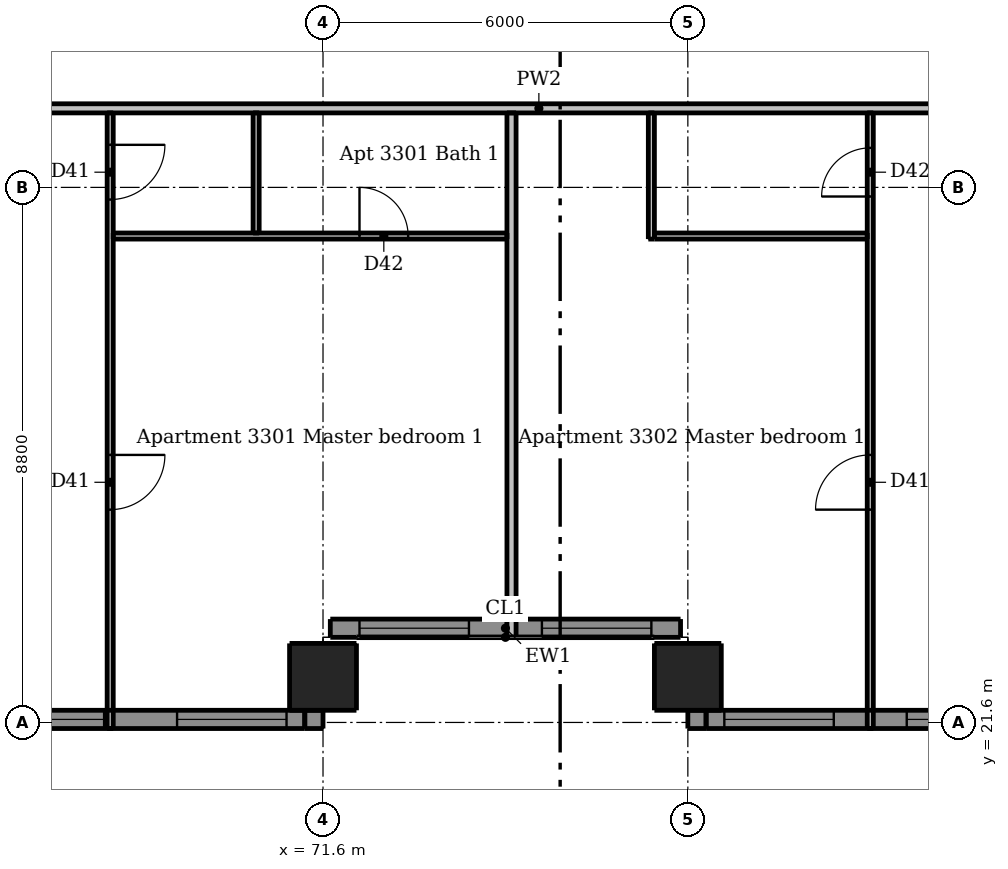
"""IFC4 building model, lengths in metres.
Left out: names, types, materials, properties, quantities, classifications, styles, units other than length and angle.
Written with IfcOpenShell. Run it as: python <this file> out.ifc"""

import sys

from ifc_helpers import new_model, si_unit, direction, frame, frame_2d, origin, origin_2d, place, context, subcontext, project, spatial, rectangle, extrude, element, fill, save


model = new_model("IFC4")
c1 = context("Model", 3, precision=1e-05, world=origin(), true_north=direction((0.0, 1.0)))
c2 = subcontext(c1, "Body", "Model", "MODEL_VIEW")
j1 = project(units=[si_unit("LENGTHUNIT", "METRE"), si_unit("PLANEANGLEUNIT", "RADIAN")], contexts=[c1])
p1 = place(None, origin())
s1 = spatial("IfcSite", under=j1, at=p1, CompositionType="ELEMENT")
p2 = place(p1, origin())
s2 = spatial("IfcBuilding", under=s1, at=p2, CompositionType="ELEMENT")
p3 = place(p2, frame((0.0, 0.0, 121.6)))
s3 = spatial("IfcBuildingStorey", under=s2, at=p3, CompositionType="ELEMENT", Elevation=121.6)
for number, where, z_axis, x_axis in (
    (1, (71.6, 22.35, 0.0), (0.0, 0.0, 1.0), (1.0, 0.0, 0.0)),
    (2, (77.6, 22.35, 0.0), (0.0, 0.0, 1.0), (1.0, 0.0, 0.0)),
):
    element("IfcColumn", number, at=place(p3, frame(where, z_axis=z_axis, x_axis=x_axis)), inside=s3, PredefinedType="COLUMN", context=c2, shape_type="SweptSolid", body=[
        extrude(rectangle(XDim=1.1, YDim=1.1, at=origin_2d()), origin(), (0.0, 0.0, 1.0), 2.95),
    ])
for number, where, z_axis, x_axis in (
    (3, (71.45, 21.5, 0.0), (0.0, 0.0, 1.0), (0.0, 1.0, 0.0)),
    (4, (77.75, 21.8, 0.0), (0.0, 0.0, 1.0), (0.0, -1.0, 0.0)),
):
    element("IfcWall", number, at=place(p3, frame(where, z_axis=z_axis, x_axis=x_axis)), inside=s3, PredefinedType="SOLIDWALL", context=c2, shape_type="SweptSolid", body=[
        extrude(rectangle(XDim=0.3, YDim=0.3, at=frame_2d((0.15, 0.0))), origin(), (0.0, 0.0, 1.0), 2.95),
    ])
p4 = place(p3, frame((65.6, 21.65, 0.0), z_axis=(0.0, 0.0, 1.0), x_axis=(1.0, 0.0, 0.0)))
e5 = element("IfcWall", 5, at=p4, inside=s3, PredefinedType="SOLIDWALL", context=c2, shape_type="SweptSolid", body=[
    extrude(rectangle(XDim=5.7, YDim=0.3, at=frame_2d((2.85, 0.0))), origin(), (0.0, 0.0, 1.0), 2.34),
])
p5 = place(p4, frame((0.6, 0.0, 0.15)))
e6 = element("IfcOpeningElement", 6, at=p5, cuts=e5, PredefinedType="OPENING", context=c2, shape_type="SweptSolid", body=[
    extrude(rectangle(XDim=1.8, YDim=2.1, at=frame_2d((0.9, 1.05))), frame((0.0, 0.16, 0.0), z_axis=(0.0, -1.0, 0.0), x_axis=(1.0, 0.0, 0.0)), (0.0, 0.0, 1.0), 0.32),
])
p6 = place(p4, frame((3.6, 0.0, 0.15)))
e7 = element("IfcOpeningElement", 7, at=p6, cuts=e5, PredefinedType="OPENING", context=c2, shape_type="SweptSolid", body=[
    extrude(rectangle(XDim=1.8, YDim=2.1, at=frame_2d((0.9, 1.05))), frame((0.0, 0.16, 0.0), z_axis=(0.0, -1.0, 0.0), x_axis=(1.0, 0.0, 0.0)), (0.0, 0.0, 1.0), 0.32),
])
p7 = place(p3, frame((71.72, 23.15, 0.0), z_axis=(0.0, 0.0, 1.0), x_axis=(1.0, 0.0, 0.0)))
e8 = element("IfcWall", 8, at=p7, inside=s3, PredefinedType="SOLIDWALL", context=c2, shape_type="SweptSolid", body=[
    extrude(rectangle(XDim=5.76, YDim=0.3, at=frame_2d((2.88, 0.0))), origin(), (0.0, 0.0, 1.0), 2.34),
])
p8 = place(p7, frame((0.48, 0.0, 0.15)))
e9 = element("IfcOpeningElement", 9, at=p8, cuts=e8, PredefinedType="OPENING", context=c2, shape_type="SweptSolid", body=[
    extrude(rectangle(XDim=1.8, YDim=2.1, at=frame_2d((0.9, 1.05))), frame((0.0, 0.16, 0.0), z_axis=(0.0, -1.0, 0.0), x_axis=(1.0, 0.0, 0.0)), (0.0, 0.0, 1.0), 0.32),
])
p9 = place(p7, frame((3.48, 0.0, 0.15)))
e10 = element("IfcOpeningElement", 10, at=p9, cuts=e8, PredefinedType="OPENING", context=c2, shape_type="SweptSolid", body=[
    extrude(rectangle(XDim=1.8, YDim=2.1, at=frame_2d((0.9, 1.05))), frame((0.0, 0.16, 0.0), z_axis=(0.0, -1.0, 0.0), x_axis=(1.0, 0.0, 0.0)), (0.0, 0.0, 1.0), 0.32),
])
p10 = place(p3, frame((77.9, 21.65, 0.0), z_axis=(0.0, 0.0, 1.0), x_axis=(1.0, 0.0, 0.0)))
e11 = element("IfcWall", 11, at=p10, inside=s3, PredefinedType="SOLIDWALL", context=c2, shape_type="SweptSolid", body=[
    extrude(rectangle(XDim=5.4, YDim=0.3, at=frame_2d((2.7, 0.0))), origin(), (0.0, 0.0, 1.0), 2.34),
])
p11 = place(p10, frame((0.3, 0.0, 0.15)))
e12 = element("IfcOpeningElement", 12, at=p11, cuts=e11, PredefinedType="OPENING", context=c2, shape_type="SweptSolid", body=[
    extrude(rectangle(XDim=1.8, YDim=2.1, at=frame_2d((0.9, 1.05))), frame((0.0, 0.16, 0.0), z_axis=(0.0, -1.0, 0.0), x_axis=(1.0, 0.0, 0.0)), (0.0, 0.0, 1.0), 0.32),
])
p12 = place(p10, frame((3.3, 0.0, 0.15)))
e13 = element("IfcOpeningElement", 13, at=p12, cuts=e11, PredefinedType="OPENING", context=c2, shape_type="SweptSolid", body=[
    extrude(rectangle(XDim=1.8, YDim=2.1, at=frame_2d((0.9, 1.05))), frame((0.0, 0.16, 0.0), z_axis=(0.0, -1.0, 0.0), x_axis=(1.0, 0.0, 0.0)), (0.0, 0.0, 1.0), 0.32),
])
p13 = place(p3, frame((68.1, 31.625, 0.0), z_axis=(0.0, 0.0, 1.0), x_axis=(0.0, -1.0, 0.0)))
e14 = element("IfcWall", 14, at=p13, inside=s3, PredefinedType="PARTITIONING", context=c2, shape_type="SweptSolid", body=[
    extrude(rectangle(XDim=10.125, YDim=0.1, at=frame_2d((5.062, 0.0))), origin(), (0.0, 0.0, 1.0), 2.95),
])
p14 = place(p13, frame((0.525, 0.0, 0.0)))
e15 = element("IfcOpeningElement", 15, at=p14, cuts=e14, PredefinedType="OPENING", context=c2, shape_type="SweptSolid", body=[
    extrude(rectangle(XDim=0.9, YDim=2.1, at=frame_2d((0.45, 1.05))), frame((0.0, 0.06, 0.0), z_axis=(0.0, -1.0, 0.0), x_axis=(1.0, 0.0, 0.0)), (0.0, 0.0, 1.0), 0.12),
])
p15 = place(p13, frame((5.625, 0.0, 0.0)))
e16 = element("IfcOpeningElement", 16, at=p15, cuts=e14, PredefinedType="OPENING", context=c2, shape_type="SweptSolid", body=[
    extrude(rectangle(XDim=0.9, YDim=2.1, at=frame_2d((0.45, 1.05))), frame((0.0, 0.06, 0.0), z_axis=(0.0, -1.0, 0.0), x_axis=(1.0, 0.0, 0.0)), (0.0, 0.0, 1.0), 0.12),
])
p16 = place(p3, frame((70.5, 29.65, 0.0), z_axis=(0.0, 0.0, 1.0), x_axis=(0.0, 1.0, 0.0)))
e17 = element("IfcWall", 17, at=p16, inside=s3, PredefinedType="PARTITIONING", context=c2, shape_type="SweptSolid", body=[
    extrude(rectangle(XDim=1.975, YDim=0.1, at=frame_2d((0.988, 0.0))), origin(), (0.0, 0.0, 1.0), 2.95),
])
p17 = place(p3, frame((77.0, 29.55, 0.0), z_axis=(0.0, 0.0, 1.0), x_axis=(0.0, 1.0, 0.0)))
e18 = element("IfcWall", 18, at=p17, inside=s3, PredefinedType="PARTITIONING", context=c2, shape_type="SweptSolid", body=[
    extrude(rectangle(XDim=2.075, YDim=0.1, at=frame_2d((1.038, 0.0))), origin(), (0.0, 0.0, 1.0), 2.95),
])
p18 = place(p3, frame((80.6, 21.5, 0.0), z_axis=(0.0, 0.0, 1.0), x_axis=(0.0, 1.0, 0.0)))
e19 = element("IfcWall", 19, at=p18, inside=s3, PredefinedType="PARTITIONING", context=c2, shape_type="SweptSolid", body=[
    extrude(rectangle(XDim=10.125, YDim=0.1, at=frame_2d((5.062, 0.0))), origin(), (0.0, 0.0, 1.0), 2.95),
])
p19 = place(p18, frame((3.6, 0.0, 0.0)))
e20 = element("IfcOpeningElement", 20, at=p19, cuts=e19, PredefinedType="OPENING", context=c2, shape_type="SweptSolid", body=[
    extrude(rectangle(XDim=0.9, YDim=2.1, at=frame_2d((0.45, 1.05))), frame((0.0, 0.06, 0.0), z_axis=(0.0, -1.0, 0.0), x_axis=(1.0, 0.0, 0.0)), (0.0, 0.0, 1.0), 0.12),
])
p20 = place(p18, frame((8.75, 0.0, 0.0)))
e21 = element("IfcOpeningElement", 21, at=p20, cuts=e19, PredefinedType="OPENING", context=c2, shape_type="SweptSolid", body=[
    extrude(rectangle(XDim=0.8, YDim=2.1, at=frame_2d((0.4, 1.05))), frame((0.0, 0.06, 0.0), z_axis=(0.0, -1.0, 0.0), x_axis=(1.0, 0.0, 0.0)), (0.0, 0.0, 1.0), 0.12),
])
p21 = place(p3, frame((68.15, 29.6, 0.0), z_axis=(0.0, 0.0, 1.0), x_axis=(1.0, 0.0, 0.0)))
e22 = element("IfcWall", 22, at=p21, inside=s3, PredefinedType="PARTITIONING", context=c2, shape_type="SweptSolid", body=[
    extrude(rectangle(XDim=6.475, YDim=0.1, at=frame_2d((3.238, 0.0))), origin(), (0.0, 0.0, 1.0), 2.95),
])
p22 = place(p21, frame((4.05, 0.0, 0.0)))
e23 = element("IfcOpeningElement", 23, at=p22, cuts=e22, PredefinedType="OPENING", context=c2, shape_type="SweptSolid", body=[
    extrude(rectangle(XDim=0.8, YDim=2.1, at=frame_2d((0.4, 1.05))), frame((0.0, 0.06, 0.0), z_axis=(0.0, -1.0, 0.0), x_axis=(1.0, 0.0, 0.0)), (0.0, 0.0, 1.0), 0.12),
])
p23 = place(p3, frame((77.05, 29.6, 0.0), z_axis=(0.0, 0.0, 1.0), x_axis=(1.0, 0.0, 0.0)))
e24 = element("IfcWall", 24, at=p23, inside=s3, PredefinedType="PARTITIONING", context=c2, shape_type="SweptSolid", body=[
    extrude(rectangle(XDim=3.5, YDim=0.1, at=frame_2d((1.75, 0.0))), origin(), (0.0, 0.0, 1.0), 2.95),
])
p24 = place(p3, frame((74.7, 23.0, 0.0), z_axis=(0.0, 0.0, 1.0), x_axis=(0.0, 1.0, 0.0)))
e25 = element("IfcWall", 25, at=p24, inside=s3, PredefinedType="PARTITIONING", context=c2, shape_type="SweptSolid", body=[
    extrude(rectangle(XDim=8.625, YDim=0.15, at=frame_2d((4.312, 0.0))), origin(), (0.0, 0.0, 1.0), 2.95),
])
p25 = place(p3, frame((89.525, 31.7, 0.0), z_axis=(0.0, 0.0, 1.0), x_axis=(-1.0, 0.0, 0.0)))
e26 = element("IfcWall", 26, at=p25, inside=s3, PredefinedType="PARTITIONING", context=c2, shape_type="SweptSolid", body=[
    extrude(rectangle(XDim=28.75, YDim=0.15, at=frame_2d((14.375, 0.0))), origin(), (0.0, 0.0, 1.0), 2.95),
])
p26 = place(p25, frame((24.625, 0.0, 0.0)))
e27 = element("IfcOpeningElement", 27, at=p26, cuts=e26, PredefinedType="OPENING", context=c2, shape_type="SweptSolid", body=[
    extrude(rectangle(XDim=1.0, YDim=2.1, at=frame_2d((0.5, 1.05))), frame((0.0, 0.085, 0.0), z_axis=(0.0, -1.0, 0.0), x_axis=(1.0, 0.0, 0.0)), (0.0, 0.0, 1.0), 0.17),
])
p27 = place(p25, frame((5.425, 0.0, 0.0)))
e28 = element("IfcOpeningElement", 28, at=p27, cuts=e26, PredefinedType="OPENING", context=c2, shape_type="SweptSolid", body=[
    extrude(rectangle(XDim=1.0, YDim=2.1, at=frame_2d((0.5, 1.05))), frame((0.0, 0.085, 0.0), z_axis=(0.0, -1.0, 0.0), x_axis=(1.0, 0.0, 0.0)), (0.0, 0.0, 1.0), 0.17),
])
p28 = place(p5, origin())
e29 = element("IfcWindow", 29, at=p28, inside=s3, PartitioningType="DOUBLE_PANEL_VERTICAL", PredefinedType="WINDOW", context=c2, shape_type="SweptSolid", body=[
    extrude(rectangle(XDim=1.8, YDim=2.1, at=frame_2d((0.9, 1.05))), frame((0.0, 0.03, 0.0), z_axis=(0.0, -1.0, 0.0), x_axis=(1.0, 0.0, 0.0)), (0.0, 0.0, 1.0), 0.06),
])
fill(e6, e29)
p29 = place(p6, origin())
e30 = element("IfcWindow", 30, at=p29, inside=s3, PartitioningType="DOUBLE_PANEL_VERTICAL", PredefinedType="WINDOW", context=c2, shape_type="SweptSolid", body=[
    extrude(rectangle(XDim=1.8, YDim=2.1, at=frame_2d((0.9, 1.05))), frame((0.0, 0.03, 0.0), z_axis=(0.0, -1.0, 0.0), x_axis=(1.0, 0.0, 0.0)), (0.0, 0.0, 1.0), 0.06),
])
fill(e7, e30)
p30 = place(p8, origin())
e31 = element("IfcWindow", 31, at=p30, inside=s3, PartitioningType="DOUBLE_PANEL_VERTICAL", PredefinedType="WINDOW", context=c2, shape_type="SweptSolid", body=[
    extrude(rectangle(XDim=1.8, YDim=2.1, at=frame_2d((0.9, 1.05))), frame((0.0, 0.03, 0.0), z_axis=(0.0, -1.0, 0.0), x_axis=(1.0, 0.0, 0.0)), (0.0, 0.0, 1.0), 0.06),
])
fill(e9, e31)
p31 = place(p9, origin())
e32 = element("IfcWindow", 32, at=p31, inside=s3, PartitioningType="DOUBLE_PANEL_VERTICAL", PredefinedType="WINDOW", context=c2, shape_type="SweptSolid", body=[
    extrude(rectangle(XDim=1.8, YDim=2.1, at=frame_2d((0.9, 1.05))), frame((0.0, 0.03, 0.0), z_axis=(0.0, -1.0, 0.0), x_axis=(1.0, 0.0, 0.0)), (0.0, 0.0, 1.0), 0.06),
])
fill(e10, e32)
p32 = place(p11, origin())
e33 = element("IfcWindow", 33, at=p32, inside=s3, PartitioningType="DOUBLE_PANEL_VERTICAL", PredefinedType="WINDOW", context=c2, shape_type="SweptSolid", body=[
    extrude(rectangle(XDim=1.8, YDim=2.1, at=frame_2d((0.9, 1.05))), frame((0.0, 0.03, 0.0), z_axis=(0.0, -1.0, 0.0), x_axis=(1.0, 0.0, 0.0)), (0.0, 0.0, 1.0), 0.06),
])
fill(e12, e33)
p33 = place(p12, origin())
e34 = element("IfcWindow", 34, at=p33, inside=s3, PartitioningType="DOUBLE_PANEL_VERTICAL", PredefinedType="WINDOW", context=c2, shape_type="SweptSolid", body=[
    extrude(rectangle(XDim=1.8, YDim=2.1, at=frame_2d((0.9, 1.05))), frame((0.0, 0.03, 0.0), z_axis=(0.0, -1.0, 0.0), x_axis=(1.0, 0.0, 0.0)), (0.0, 0.0, 1.0), 0.06),
])
fill(e13, e34)
p34 = place(p14, origin())
e35 = element("IfcDoor", 35, at=p34, inside=s3, OperationType="SINGLE_SWING_LEFT", PredefinedType="DOOR", context=c2, shape_type="SweptSolid", body=[
    extrude(rectangle(XDim=0.9, YDim=2.1, at=frame_2d((0.45, 1.05))), frame((0.0, 0.025, 0.0), z_axis=(0.0, -1.0, 0.0), x_axis=(1.0, 0.0, 0.0)), (0.0, 0.0, 1.0), 0.05),
])
fill(e15, e35)
p35 = place(p15, origin())
e36 = element("IfcDoor", 36, at=p35, inside=s3, OperationType="SINGLE_SWING_LEFT", PredefinedType="DOOR", context=c2, shape_type="SweptSolid", body=[
    extrude(rectangle(XDim=0.9, YDim=2.1, at=frame_2d((0.45, 1.05))), frame((0.0, 0.025, 0.0), z_axis=(0.0, -1.0, 0.0), x_axis=(1.0, 0.0, 0.0)), (0.0, 0.0, 1.0), 0.05),
])
fill(e16, e36)
p36 = place(p22, origin())
e37 = element("IfcDoor", 37, at=p36, inside=s3, OperationType="SINGLE_SWING_LEFT", PredefinedType="DOOR", context=c2, shape_type="SweptSolid", body=[
    extrude(rectangle(XDim=0.8, YDim=2.1, at=frame_2d((0.4, 1.05))), frame((0.0, 0.025, 0.0), z_axis=(0.0, -1.0, 0.0), x_axis=(1.0, 0.0, 0.0)), (0.0, 0.0, 1.0), 0.05),
])
fill(e23, e37)
p37 = place(p19, origin())
e38 = element("IfcDoor", 38, at=p37, inside=s3, OperationType="SINGLE_SWING_LEFT", PredefinedType="DOOR", context=c2, shape_type="SweptSolid", body=[
    extrude(rectangle(XDim=0.9, YDim=2.1, at=frame_2d((0.45, 1.05))), frame((0.0, 0.025, 0.0), z_axis=(0.0, -1.0, 0.0), x_axis=(1.0, 0.0, 0.0)), (0.0, 0.0, 1.0), 0.05),
])
fill(e20, e38)
p38 = place(p20, origin())
e39 = element("IfcDoor", 39, at=p38, inside=s3, OperationType="SINGLE_SWING_LEFT", PredefinedType="DOOR", context=c2, shape_type="SweptSolid", body=[
    extrude(rectangle(XDim=0.8, YDim=2.1, at=frame_2d((0.4, 1.05))), frame((0.0, 0.025, 0.0), z_axis=(0.0, -1.0, 0.0), x_axis=(1.0, 0.0, 0.0)), (0.0, 0.0, 1.0), 0.05),
])
fill(e21, e39)
save(model, sys.argv[1])
